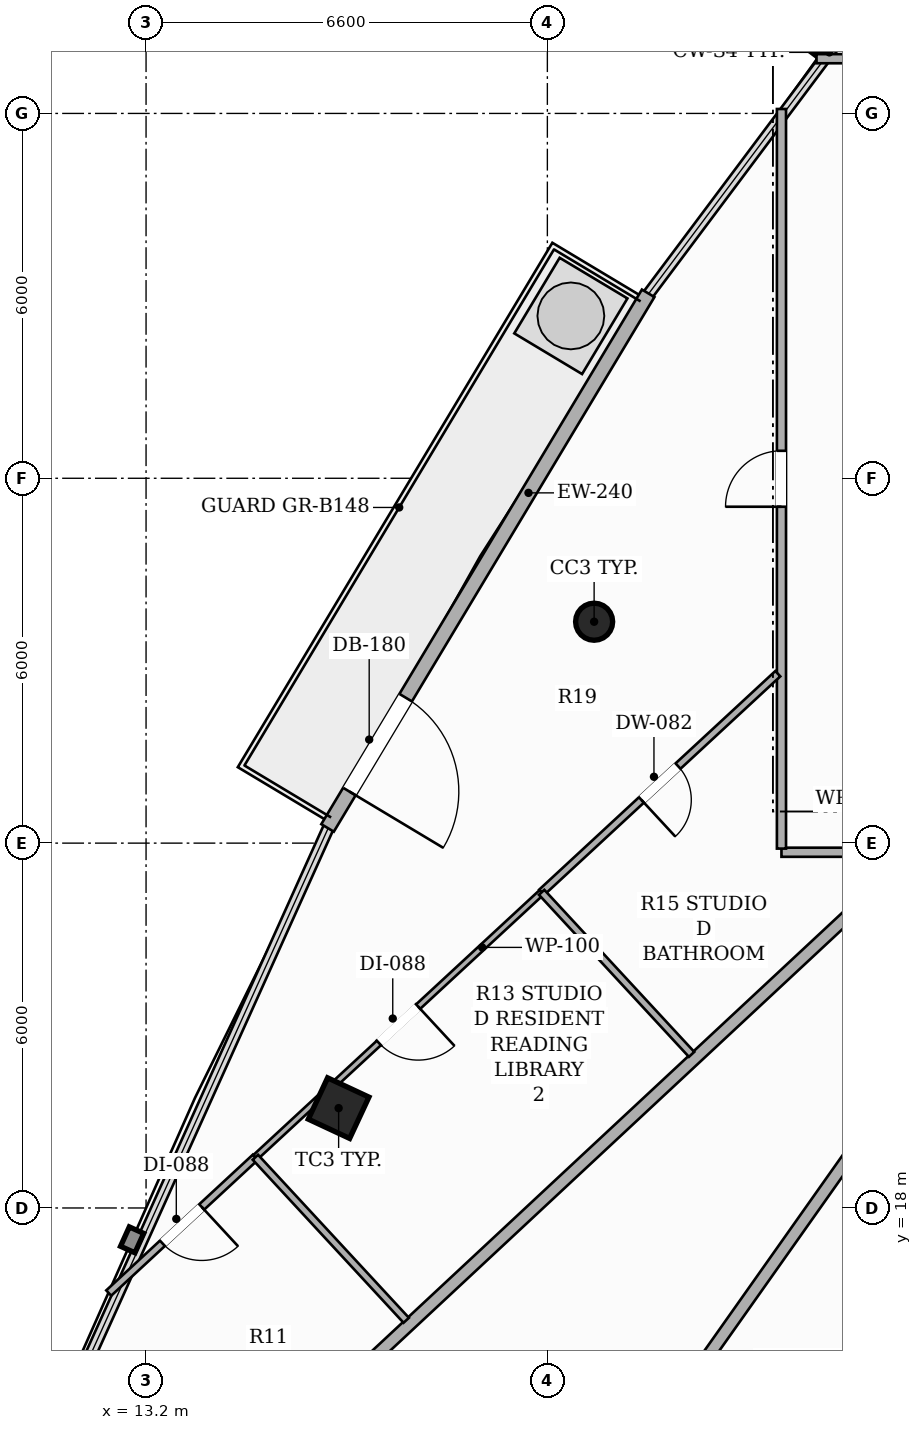
"""IFC4 building model, lengths in metres.
Left out: names, types, materials, properties, quantities, classifications, styles, units other than length and angle.
Written with IfcOpenShell. Run it as: python <this file> out.ifc"""

import sys

from ifc_helpers import new_model, si_unit, direction, frame, frame_2d, origin, origin_2d, place, context, subcontext, project, spatial, rectangle, hollow_rectangle, hollow_circle, extrude, element, fill, save


model = new_model("IFC4")
c1 = context("Model", 3, precision=1e-05, world=origin(), true_north=direction((0.0, 1.0)))
c2 = subcontext(c1, "Body", "Model", "MODEL_VIEW")
j1 = project(units=[si_unit("LENGTHUNIT", "METRE"), si_unit("PLANEANGLEUNIT", "RADIAN")], contexts=[c1])
p1 = place(None, origin())
s1 = spatial("IfcSite", under=j1, at=p1, CompositionType="ELEMENT")
p2 = place(p1, origin())
s2 = spatial("IfcBuilding", under=s1, at=p2, CompositionType="ELEMENT")
p3 = place(p2, frame((0.0, 0.0, 216.2)))
s3 = spatial("IfcBuildingStorey", under=s2, at=p3, CompositionType="ELEMENT", Elevation=216.2)
p4 = place(p3, frame((20.569, 27.641, 0.0), z_axis=(0.0, 0.0, 1.0), x_axis=(1.0, 0.0, 0.0)))
e1 = element("IfcColumn", 1, at=p4, inside=s3, PredefinedType="COLUMN", context=c2, shape_type="SweptSolid", body=[
    extrude(hollow_circle(Radius=0.305, WallThickness=0.016, at=origin_2d()), origin(), (0.0, 0.0, 1.0), 3.3),
])
p5 = place(p3, frame((16.367, 19.642, 0.0), z_axis=(0.0, 0.0, 1.0), x_axis=(0.422618261741, 0.906307787037, 0.0)))
e2 = element("IfcColumn", 2, at=p5, inside=s3, PredefinedType="COLUMN", context=c2, shape_type="SweptSolid", body=[
    extrude(hollow_rectangle(XDim=0.75, YDim=0.75, WallThickness=0.025, at=origin_2d()), origin(), (0.0, 0.0, 1.0), 3.3),
])
p6 = place(p3, frame((21.458, 33.042, 0.0), z_axis=(0.0, 0.0, 1.0), x_axis=(-0.51433465168, -0.857589567381, 0.0)))
e3 = element("IfcWall", 3, at=p6, inside=s3, PredefinedType="SOLIDWALL", context=c2, shape_type="SweptSolid", body=[
    extrude(rectangle(XDim=10.252, YDim=0.24, at=frame_2d((5.126, 0.0))), origin(), (0.0, 0.0, 1.0), 2.624),
])
p7 = place(p6, frame((7.754, 0.0, 0.0)))
e4 = element("IfcOpeningElement", 4, at=p7, cuts=e3, PredefinedType="OPENING", context=c2, shape_type="SweptSolid", body=[
    extrude(rectangle(XDim=1.8, YDim=2.2, at=frame_2d((0.9, 1.1))), frame((0.0, 0.13, 0.0), z_axis=(0.0, -1.0, 0.0), x_axis=(1.0, 0.0, 0.0)), (0.0, 0.0, 1.0), 0.26),
])
p8 = place(p3, frame((32.073, 23.85, 0.0), z_axis=(0.0, 0.0, 1.0), x_axis=(-1.0, 0.0, 0.0)))
e5 = element("IfcWall", 5, at=p8, inside=s3, PredefinedType="PARTITIONING", context=c2, shape_type="SweptSolid", body=[
    extrude(rectangle(XDim=8.423, YDim=0.15, at=frame_2d((4.211, 0.0))), origin(), (0.0, 0.0, 1.0), 2.565),
])
p9 = place(p8, frame((1.601, 0.0, 0.0)))
e6 = element("IfcOpeningElement", 6, at=p9, cuts=e5, PredefinedType="OPENING", context=c2, shape_type="SweptSolid", body=[
    extrude(rectangle(XDim=0.92, YDim=2.15, at=frame_2d((0.46, 1.075))), frame((0.0, 0.085, 0.0), z_axis=(0.0, -1.0, 0.0), x_axis=(1.0, 0.0, 0.0)), (0.0, 0.0, 1.0), 0.17),
])
p10 = place(p8, frame((4.841, 0.0, 0.0)))
e7 = element("IfcOpeningElement", 7, at=p10, cuts=e5, PredefinedType="OPENING", context=c2, shape_type="SweptSolid", body=[
    extrude(rectangle(XDim=0.88, YDim=2.1, at=frame_2d((0.44, 1.05))), frame((0.0, 0.085, 0.0), z_axis=(0.0, -1.0, 0.0), x_axis=(1.0, 0.0, 0.0)), (0.0, 0.0, 1.0), 0.17),
])
p11 = place(p3, frame((23.65, 23.91, 0.0), z_axis=(0.0, 0.0, 1.0), x_axis=(0.0, 1.0, 0.0)))
e8 = element("IfcWall", 8, at=p11, inside=s3, PredefinedType="PARTITIONING", context=c2, shape_type="SweptSolid", body=[
    extrude(rectangle(XDim=12.163, YDim=0.15, at=frame_2d((6.082, 0.0))), origin(), (0.0, 0.0, 1.0), 2.492),
])
p12 = place(p11, frame((5.622, 0.0, 0.0)))
e9 = element("IfcOpeningElement", 9, at=p12, cuts=e8, PredefinedType="OPENING", context=c2, shape_type="SweptSolid", body=[
    extrude(rectangle(XDim=0.92, YDim=2.15, at=frame_2d((0.46, 1.075))), frame((0.0, 0.085, 0.0), z_axis=(0.0, -1.0, 0.0), x_axis=(1.0, 0.0, 0.0)), (0.0, 0.0, 1.0), 0.17),
])
p13 = place(p3, frame((24.226, 36.9, 0.0), z_axis=(0.0, 0.0, 1.0), x_axis=(1.0, 0.0, 0.0)))
e10 = element("IfcWall", 10, at=p13, inside=s3, PredefinedType="PARTITIONING", context=c2, shape_type="SweptSolid", body=[
    extrude(rectangle(XDim=1.924, YDim=0.15, at=frame_2d((0.962, 0.0))), origin(), (0.0, 0.0, 1.0), 2.619),
])
p14 = place(p13, frame((0.502, 0.0, 0.0)))
e11 = element("IfcOpeningElement", 11, at=p14, cuts=e10, PredefinedType="OPENING", context=c2, shape_type="SweptSolid", body=[
    extrude(rectangle(XDim=0.92, YDim=2.15, at=frame_2d((0.46, 1.075))), frame((0.0, 0.085, 0.0), z_axis=(0.0, -1.0, 0.0), x_axis=(1.0, 0.0, 0.0)), (0.0, 0.0, 1.0), 0.17),
])
p15 = place(p3, frame((15.776, 6.132, 0.0), z_axis=(0.0, 0.0, 1.0), x_axis=(0.577200381612, 0.816602546816, 0.0)))
e12 = element("IfcWall", 12, at=p15, inside=s3, PredefinedType="PARTITIONING", context=c2, shape_type="SweptSolid", body=[
    extrude(rectangle(XDim=21.624, YDim=0.2, at=frame_2d((10.812, 0.0))), origin(), (0.0, 0.0, 1.0), 2.492),
])
p16 = place(p3, frame((25.799, 23.79, 0.0), z_axis=(0.0, 0.0, 1.0), x_axis=(-0.731584830333, -0.681750420629, 0.0)))
e13 = element("IfcWall", 13, at=p16, inside=s3, PredefinedType="PARTITIONING", context=c2, shape_type="SweptSolid", body=[
    extrude(rectangle(XDim=21.776, YDim=0.2, at=frame_2d((10.888, 0.0))), origin(), (0.0, 0.0, 1.0), 2.492),
])
p17 = place(p3, frame((23.59, 26.786, 0.0), z_axis=(0.0, 0.0, 1.0), x_axis=(-0.733888422473, -0.679270037143, 0.0)))
e14 = element("IfcWall", 14, at=p17, inside=s3, PredefinedType="PARTITIONING", context=c2, shape_type="SweptSolid", body=[
    extrude(rectangle(XDim=5.292, YDim=0.12, at=frame_2d((2.646, 0.0))), origin(), (0.0, 0.0, 1.0), 3.06),
])
p18 = place(p17, frame((2.236, 0.0, 0.0)))
e15 = element("IfcOpeningElement", 15, at=p18, cuts=e14, PredefinedType="OPENING", context=c2, shape_type="SweptSolid", body=[
    extrude(rectangle(XDim=0.82, YDim=2.1, at=frame_2d((0.41, 1.05))), frame((0.0, 0.07, 0.0), z_axis=(0.0, -1.0, 0.0), x_axis=(1.0, 0.0, 0.0)), (0.0, 0.0, 1.0), 0.14),
])
p19 = place(p3, frame((14.998, 18.834, 0.0), z_axis=(0.0, 0.0, 1.0), x_axis=(-0.733840210512, -0.679322121998, 0.0)))
e16 = element("IfcWall", 16, at=p19, inside=s3, PredefinedType="PARTITIONING", context=c2, shape_type="SweptSolid", body=[
    extrude(rectangle(XDim=3.287, YDim=0.12, at=frame_2d((1.644, 0.0))), origin(), (0.0, 0.0, 1.0), 3.06),
])
p20 = place(p19, frame((1.203, 0.0, 0.0)))
e17 = element("IfcOpeningElement", 17, at=p20, cuts=e16, PredefinedType="OPENING", context=c2, shape_type="SweptSolid", body=[
    extrude(rectangle(XDim=0.88, YDim=2.1, at=frame_2d((0.44, 1.05))), frame((0.0, 0.07, 0.0), z_axis=(0.0, -1.0, 0.0), x_axis=(1.0, 0.0, 0.0)), (0.0, 0.0, 1.0), 0.14),
])
p21 = place(p3, frame((19.706, 23.191, 0.0), z_axis=(0.0, 0.0, 1.0), x_axis=(-0.733941951163, -0.679212199775, 0.0)))
e18 = element("IfcWall", 18, at=p21, inside=s3, PredefinedType="PARTITIONING", context=c2, shape_type="SweptSolid", body=[
    extrude(rectangle(XDim=6.415, YDim=0.1, at=frame_2d((3.208, 0.0))), origin(), (0.0, 0.0, 1.0), 2.492),
])
p22 = place(p21, frame((2.767, 0.0, 0.0)))
e19 = element("IfcOpeningElement", 19, at=p22, cuts=e18, PredefinedType="OPENING", context=c2, shape_type="SweptSolid", body=[
    extrude(rectangle(XDim=0.88, YDim=2.1, at=frame_2d((0.44, 1.05))), frame((0.0, 0.06, 0.0), z_axis=(0.0, -1.0, 0.0), x_axis=(1.0, 0.0, 0.0)), (0.0, 0.0, 1.0), 0.12),
])
p23 = place(p3, frame((22.172, 20.526, 0.0), z_axis=(0.0, 0.0, 1.0), x_axis=(-0.67917603964, 0.733975413198, 0.0)))
e20 = element("IfcWall", 20, at=p23, inside=s3, PredefinedType="PARTITIONING", context=c2, shape_type="SweptSolid", body=[
    extrude(rectangle(XDim=3.631, YDim=0.12, at=frame_2d((1.815, 0.0))), origin(), (0.0, 0.0, 1.0), 2.565),
])
p24 = place(p3, frame((14.998, 18.834, 0.0), z_axis=(0.0, 0.0, 1.0), x_axis=(0.67920675179, -0.733946992856, 0.0)))
e21 = element("IfcWall", 21, at=p24, inside=s3, PredefinedType="PARTITIONING", context=c2, shape_type="SweptSolid", body=[
    extrude(rectangle(XDim=3.653, YDim=0.12, at=frame_2d((1.826, 0.0))), origin(), (0.0, 0.0, 1.0), 2.492),
])
p25 = place(p7, origin())
e22 = element("IfcDoor", 22, at=p25, inside=s3, OperationType="SINGLE_SWING_RIGHT", PredefinedType="DOOR", context=c2, shape_type="SweptSolid", body=[
    extrude(rectangle(XDim=1.8, YDim=2.2, at=frame_2d((0.9, 1.1))), frame((0.0, 0.025, 0.0), z_axis=(0.0, -1.0, 0.0), x_axis=(1.0, 0.0, 0.0)), (0.0, 0.0, 1.0), 0.05),
])
fill(e4, e22)
p26 = place(p12, origin())
e23 = element("IfcDoor", 23, at=p26, inside=s3, OperationType="SINGLE_SWING_LEFT", PredefinedType="DOOR", context=c2, shape_type="SweptSolid", body=[
    extrude(rectangle(XDim=0.92, YDim=2.15, at=frame_2d((0.46, 1.075))), frame((0.0, 0.025, 0.0), z_axis=(0.0, -1.0, 0.0), x_axis=(1.0, 0.0, 0.0)), (0.0, 0.0, 1.0), 0.05),
])
fill(e9, e23)
p27 = place(p18, origin())
e24 = element("IfcDoor", 24, at=p27, inside=s3, OperationType="SINGLE_SWING_RIGHT", PredefinedType="DOOR", context=c2, shape_type="SweptSolid", body=[
    extrude(rectangle(XDim=0.82, YDim=2.1, at=frame_2d((0.41, 1.05))), frame((0.0, 0.025, 0.0), z_axis=(0.0, -1.0, 0.0), x_axis=(1.0, 0.0, 0.0)), (0.0, 0.0, 1.0), 0.05),
])
fill(e15, e24)
p28 = place(p20, origin())
e25 = element("IfcDoor", 25, at=p28, inside=s3, OperationType="SINGLE_SWING_LEFT", PredefinedType="DOOR", context=c2, shape_type="SweptSolid", body=[
    extrude(rectangle(XDim=0.88, YDim=2.1, at=frame_2d((0.44, 1.05))), frame((0.0, 0.025, 0.0), z_axis=(0.0, -1.0, 0.0), x_axis=(1.0, 0.0, 0.0)), (0.0, 0.0, 1.0), 0.05),
])
fill(e17, e25)
p29 = place(p22, origin())
e26 = element("IfcDoor", 26, at=p29, inside=s3, OperationType="SINGLE_SWING_LEFT", PredefinedType="DOOR", context=c2, shape_type="SweptSolid", body=[
    extrude(rectangle(XDim=0.88, YDim=2.1, at=frame_2d((0.44, 1.05))), frame((0.0, 0.025, 0.0), z_axis=(0.0, -1.0, 0.0), x_axis=(1.0, 0.0, 0.0)), (0.0, 0.0, 1.0), 0.05),
])
fill(e19, e26)
save(model, sys.argv[1])
